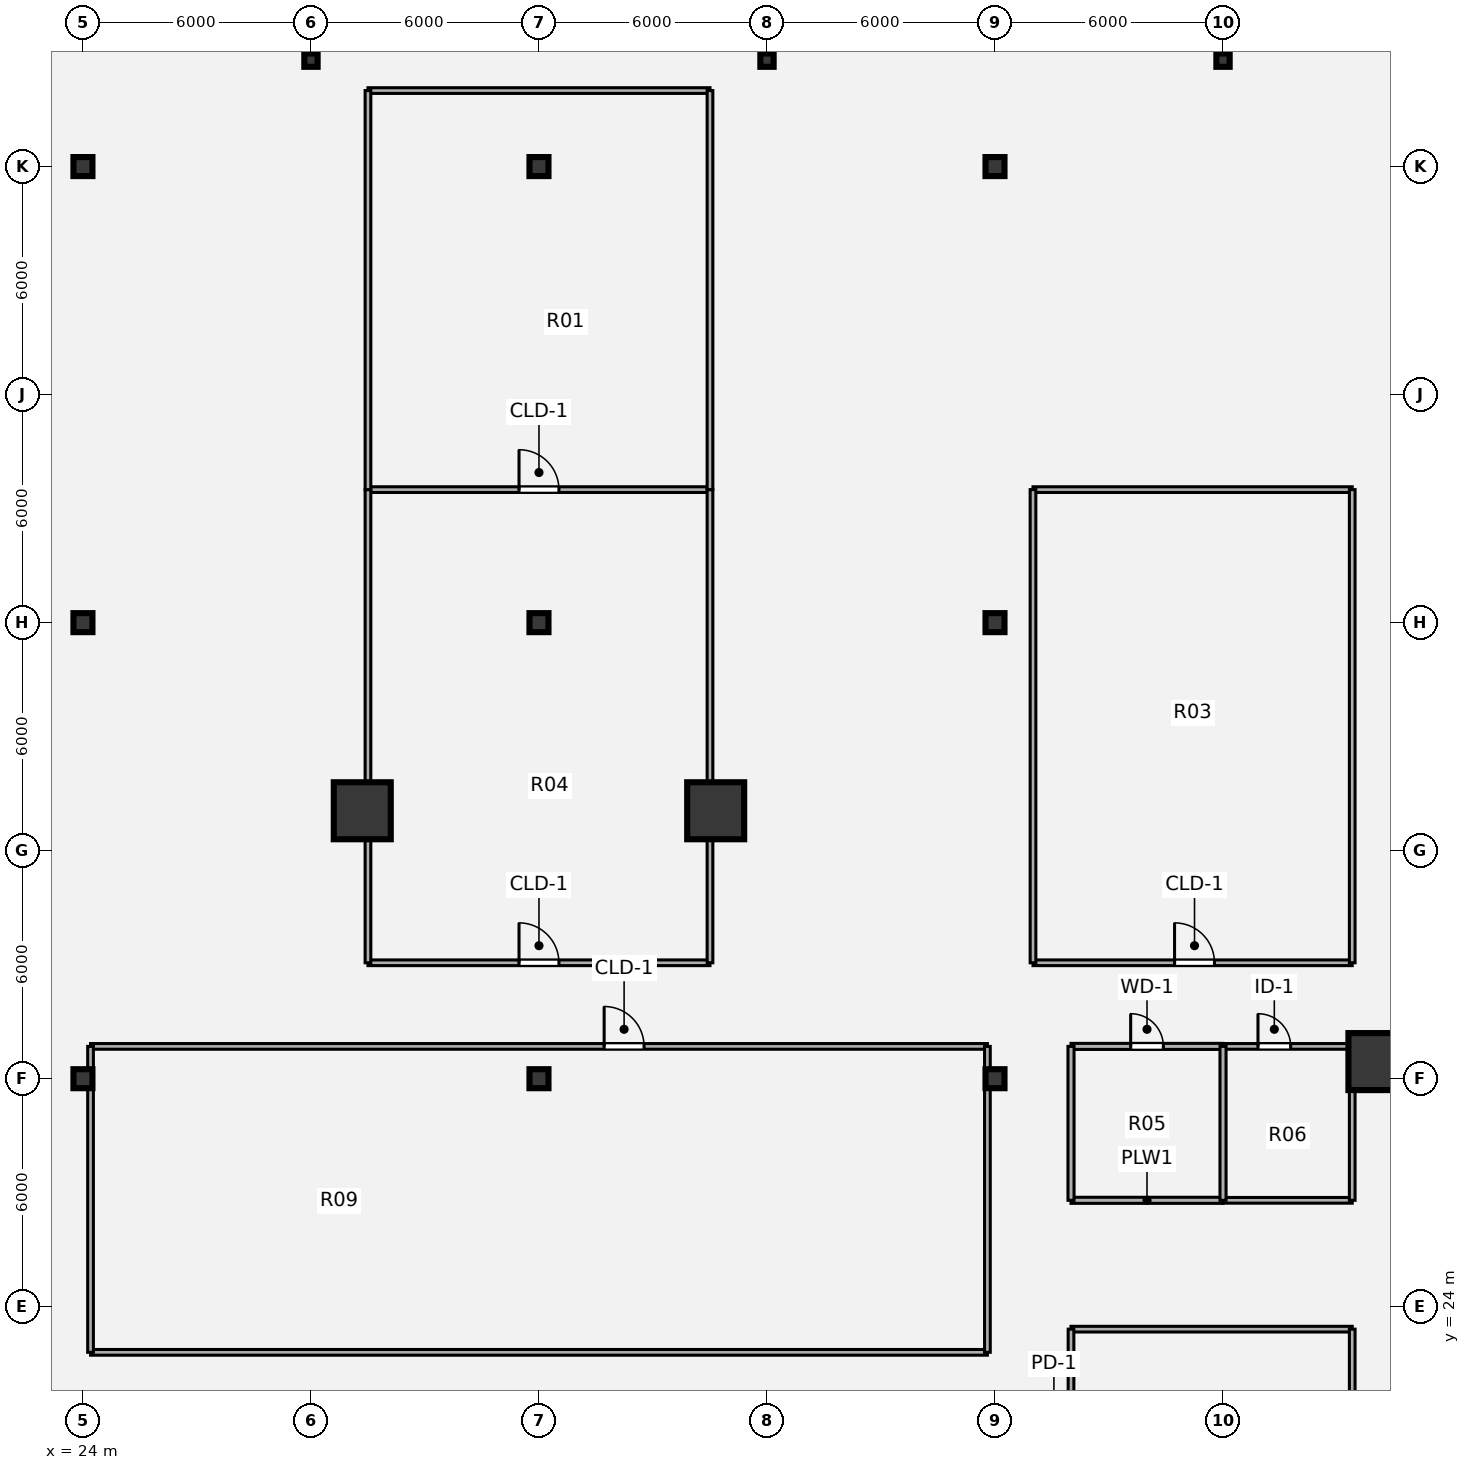
"""IFC4 building model, lengths in metres.
Left out: names, types, materials, properties, quantities, classifications, styles, units other than length and angle.
Written with IfcOpenShell. Run it as: python <this file> out.ifc"""

import sys

from ifc_helpers import new_model, si_unit, direction, frame, frame_2d, origin, origin_2d, place, context, subcontext, project, spatial, rectangle, hollow_circle, i_section, extrude, source, transform, mapped, element, fill, save


model = new_model("IFC4")
c1 = context("Model", 3, precision=1e-05, world=origin(), true_north=direction((0.0, 1.0)))
c2 = subcontext(c1, "Body", "Model", "MODEL_VIEW")
j1 = project(units=[si_unit("LENGTHUNIT", "METRE"), si_unit("PLANEANGLEUNIT", "RADIAN")], contexts=[c1])
p1 = place(None, origin())
s1 = spatial("IfcSite", under=j1, at=p1, CompositionType="ELEMENT")
p2 = place(p1, origin())
s2 = spatial("IfcBuilding", under=s1, at=p2, CompositionType="ELEMENT")
p3 = place(p2, frame((0.0, 0.0, 22.68)))
s3 = spatial("IfcBuildingStorey", under=s2, at=p3, CompositionType="ELEMENT", Elevation=22.68)
m1 = source(origin(), c2, "Body", "SweptSolid", [
    extrude(i_section(OverallWidth=0.5, OverallDepth=0.5, WebThickness=0.022, FlangeThickness=0.035, at=origin_2d()), origin(), (0.0, 0.0, 1.0), 4.32),
])
for number, where, z_axis, x_axis in (
    (1, (24.0, 30.0, 0.0), (0.0, 0.0, 1.0), (1.0, 0.0, 0.0)),
    (2, (36.0, 30.0, 0.0), (0.0, 0.0, 1.0), (1.0, 0.0, 0.0)),
    (3, (48.0, 30.0, 0.0), (0.0, 0.0, 1.0), (1.0, 0.0, 0.0)),
    (4, (24.0, 42.0, 0.0), (0.0, 0.0, 1.0), (1.0, 0.0, 0.0)),
    (5, (36.0, 42.0, 0.0), (0.0, 0.0, 1.0), (1.0, 0.0, 0.0)),
    (6, (48.0, 42.0, 0.0), (0.0, 0.0, 1.0), (1.0, 0.0, 0.0)),
    (7, (24.0, 54.0, 0.0), (0.0, 0.0, 1.0), (1.0, 0.0, 0.0)),
    (8, (36.0, 54.0, 0.0), (0.0, 0.0, 1.0), (1.0, 0.0, 0.0)),
    (9, (48.0, 54.0, 0.0), (0.0, 0.0, 1.0), (1.0, 0.0, 0.0)),
):
    element("IfcColumn", number, at=place(p3, frame(where, z_axis=z_axis, x_axis=x_axis)), inside=s3, PredefinedType="COLUMN", context=c2, shape_type="MappedRepresentation", body=[
        mapped(m1, transform((0.0, 0.0, 0.0), x_axis=(1.0, 0.0, 0.0), y_axis=(0.0, 1.0, 0.0), z_axis=(0.0, 0.0, 1.0), scale=1.0)),
    ])
m2 = source(origin(), c2, "Body", "SweptSolid", [
    extrude(i_section(OverallWidth=0.35, OverallDepth=0.35, WebThickness=0.02, FlangeThickness=0.028, at=origin_2d()), origin(), (0.0, 0.0, 1.0), 4.32),
])
for number, where, z_axis, x_axis in (
    (10, (30.0, 56.8, 0.0), (0.0, 0.0, 1.0), (1.0, 0.0, 0.0)),
    (11, (42.0, 56.8, 0.0), (0.0, 0.0, 1.0), (1.0, 0.0, 0.0)),
    (12, (54.0, 56.8, 0.0), (0.0, 0.0, 1.0), (1.0, 0.0, 0.0)),
):
    element("IfcColumn", number, at=place(p3, frame(where, z_axis=z_axis, x_axis=x_axis)), inside=s3, PredefinedType="COLUMN", context=c2, shape_type="MappedRepresentation", body=[
        mapped(m2, transform((0.0, 0.0, 0.0), x_axis=(1.0, 0.0, 0.0), y_axis=(0.0, 1.0, 0.0), z_axis=(0.0, 0.0, 1.0), scale=1.0)),
    ])
m3 = source(origin(), c2, "Body", "SweptSolid", [
    extrude(hollow_circle(Radius=0.75, WallThickness=0.05, at=origin_2d()), origin(), (0.0, 0.0, 1.0), 4.32),
])
for number, where, z_axis, x_axis in (
    (13, (58.05, 30.45, 0.0), (0.0, 0.0, 1.0), (1.0, 0.0, 0.0)),
    (14, (31.35, 37.05, 0.0), (0.0, 0.0, 1.0), (1.0, 0.0, 0.0)),
    (15, (40.65, 37.05, 0.0), (0.0, 0.0, 1.0), (1.0, 0.0, 0.0)),
):
    element("IfcColumn", number, at=place(p3, frame(where, z_axis=z_axis, x_axis=x_axis)), inside=s3, PredefinedType="COLUMN", context=c2, shape_type="MappedRepresentation", body=[
        mapped(m3, transform((0.0, 0.0, 0.0), x_axis=(1.0, 0.0, 0.0), y_axis=(0.0, 1.0, 0.0), z_axis=(0.0, 0.0, 1.0), scale=1.0)),
    ])
p4 = place(p3, frame((24.2, 22.8, 0.0), z_axis=(0.0, 0.0, 1.0), x_axis=(1.0, 0.0, 0.0)))
e16 = element("IfcWall", 16, at=p4, inside=s3, PredefinedType="PARTITIONING", context=c2, shape_type="SweptSolid", body=[
    extrude(rectangle(XDim=23.6, YDim=0.15, at=frame_2d((11.8, 0.0))), origin(), (0.0, 0.0, 1.0), 3.97),
])
p5 = place(p3, frame((50.0, 23.41, 0.0), z_axis=(0.0, 0.0, 1.0), x_axis=(1.0, 0.0, 0.0)))
e17 = element("IfcWall", 17, at=p5, inside=s3, PredefinedType="PARTITIONING", context=c2, shape_type="SweptSolid", body=[
    extrude(rectangle(XDim=7.4, YDim=0.15, at=frame_2d((3.7, 0.0))), origin(), (0.0, 0.0, 1.0), 3.97),
])
p6 = place(p3, frame((50.0, 26.8, 0.0), z_axis=(0.0, 0.0, 1.0), x_axis=(1.0, 0.0, 0.0)))
e18 = element("IfcWall", 18, at=p6, inside=s3, PredefinedType="PLUMBINGWALL", context=c2, shape_type="SweptSolid", body=[
    extrude(rectangle(XDim=4.0, YDim=0.16, at=frame_2d((2.0, 0.0))), origin(), (0.0, 0.0, 1.0), 3.97),
])
p7 = place(p3, frame((54.0, 26.8, 0.0), z_axis=(0.0, 0.0, 1.0), x_axis=(1.0, 0.0, 0.0)))
e19 = element("IfcWall", 19, at=p7, inside=s3, PredefinedType="PARTITIONING", context=c2, shape_type="SweptSolid", body=[
    extrude(rectangle(XDim=3.4, YDim=0.15, at=frame_2d((1.7, 0.0))), origin(), (0.0, 0.0, 1.0), 3.97),
])
p8 = place(p3, frame((24.2, 30.85, 0.0), z_axis=(0.0, 0.0, 1.0), x_axis=(1.0, 0.0, 0.0)))
e20 = element("IfcWall", 20, at=p8, inside=s3, PredefinedType="PARTITIONING", context=c2, shape_type="SweptSolid", body=[
    extrude(rectangle(XDim=23.6, YDim=0.15, at=frame_2d((11.8, 0.0))), origin(), (0.0, 0.0, 1.0), 3.97),
])
p9 = place(p8, frame((13.515, 0.0, 0.0)))
e21 = element("IfcOpeningElement", 21, at=p9, cuts=e20, PredefinedType="OPENING", context=c2, shape_type="SweptSolid", body=[
    extrude(rectangle(XDim=1.05, YDim=2.1, at=origin_2d()), frame((0.525, 0.085, 1.05), z_axis=(0.0, -1.0, 0.0), x_axis=(1.0, 0.0, 0.0)), (0.0, 0.0, 1.0), 0.17),
])
p10 = place(p3, frame((50.0, 30.85, 0.0), z_axis=(0.0, 0.0, 1.0), x_axis=(1.0, 0.0, 0.0)))
e22 = element("IfcWall", 22, at=p10, inside=s3, PredefinedType="PLUMBINGWALL", context=c2, shape_type="SweptSolid", body=[
    extrude(rectangle(XDim=4.0, YDim=0.16, at=frame_2d((2.0, 0.0))), origin(), (0.0, 0.0, 1.0), 3.97),
])
p11 = place(p10, frame((1.57, 0.0, 0.0)))
e23 = element("IfcOpeningElement", 23, at=p11, cuts=e22, PredefinedType="OPENING", context=c2, shape_type="SweptSolid", body=[
    extrude(rectangle(XDim=0.86, YDim=2.1, at=origin_2d()), frame((0.43, 0.09, 1.05), z_axis=(0.0, -1.0, 0.0), x_axis=(1.0, 0.0, 0.0)), (0.0, 0.0, 1.0), 0.18),
])
p12 = place(p3, frame((54.0, 30.85, 0.0), z_axis=(0.0, 0.0, 1.0), x_axis=(1.0, 0.0, 0.0)))
e24 = element("IfcWall", 24, at=p12, inside=s3, PredefinedType="PARTITIONING", context=c2, shape_type="SweptSolid", body=[
    extrude(rectangle(XDim=3.4, YDim=0.15, at=frame_2d((1.7, 0.0))), origin(), (0.0, 0.0, 1.0), 2.185),
])
p13 = place(p12, frame((0.92, 0.0, 0.0)))
e25 = element("IfcOpeningElement", 25, at=p13, cuts=e24, PredefinedType="OPENING", context=c2, shape_type="SweptSolid", body=[
    extrude(rectangle(XDim=0.86, YDim=2.1, at=origin_2d()), frame((0.43, 0.085, 1.05), z_axis=(0.0, -1.0, 0.0), x_axis=(1.0, 0.0, 0.0)), (0.0, 0.0, 1.0), 0.17),
])
p14 = place(p3, frame((31.5, 33.05, 0.0), z_axis=(0.0, 0.0, 1.0), x_axis=(1.0, 0.0, 0.0)))
e26 = element("IfcWall", 26, at=p14, inside=s3, PredefinedType="PARTITIONING", context=c2, shape_type="SweptSolid", body=[
    extrude(rectangle(XDim=9.0, YDim=0.15, at=frame_2d((4.5, 0.0))), origin(), (0.0, 0.0, 1.0), 3.97),
])
p15 = place(p14, frame((3.975, 0.0, 0.0)))
e27 = element("IfcOpeningElement", 27, at=p15, cuts=e26, PredefinedType="OPENING", context=c2, shape_type="SweptSolid", body=[
    extrude(rectangle(XDim=1.05, YDim=2.1, at=origin_2d()), frame((0.525, 0.085, 1.05), z_axis=(0.0, -1.0, 0.0), x_axis=(1.0, 0.0, 0.0)), (0.0, 0.0, 1.0), 0.17),
])
p16 = place(p3, frame((49.0, 33.05, 0.0), z_axis=(0.0, 0.0, 1.0), x_axis=(1.0, 0.0, 0.0)))
e28 = element("IfcWall", 28, at=p16, inside=s3, PredefinedType="PARTITIONING", context=c2, shape_type="SweptSolid", body=[
    extrude(rectangle(XDim=8.4, YDim=0.15, at=frame_2d((4.2, 0.0))), origin(), (0.0, 0.0, 1.0), 2.185),
])
p17 = place(p16, frame((3.725, 0.0, 0.0)))
e29 = element("IfcOpeningElement", 29, at=p17, cuts=e28, PredefinedType="OPENING", context=c2, shape_type="SweptSolid", body=[
    extrude(rectangle(XDim=1.05, YDim=2.1, at=origin_2d()), frame((0.525, 0.085, 1.05), z_axis=(0.0, -1.0, 0.0), x_axis=(1.0, 0.0, 0.0)), (0.0, 0.0, 1.0), 0.17),
])
p18 = place(p3, frame((31.5, 45.5, 0.0), z_axis=(0.0, 0.0, 1.0), x_axis=(1.0, 0.0, 0.0)))
e30 = element("IfcWall", 30, at=p18, inside=s3, PredefinedType="PARTITIONING", context=c2, shape_type="SweptSolid", body=[
    extrude(rectangle(XDim=9.0, YDim=0.15, at=frame_2d((4.5, 0.0))), origin(), (0.0, 0.0, 1.0), 3.97),
])
p19 = place(p18, frame((3.975, 0.0, 0.0)))
e31 = element("IfcOpeningElement", 31, at=p19, cuts=e30, PredefinedType="OPENING", context=c2, shape_type="SweptSolid", body=[
    extrude(rectangle(XDim=1.05, YDim=2.1, at=origin_2d()), frame((0.525, 0.085, 1.05), z_axis=(0.0, -1.0, 0.0), x_axis=(1.0, 0.0, 0.0)), (0.0, 0.0, 1.0), 0.17),
])
p20 = place(p3, frame((49.0, 45.5, 0.0), z_axis=(0.0, 0.0, 1.0), x_axis=(1.0, 0.0, 0.0)))
e32 = element("IfcWall", 32, at=p20, inside=s3, PredefinedType="PARTITIONING", context=c2, shape_type="SweptSolid", body=[
    extrude(rectangle(XDim=8.4, YDim=0.15, at=frame_2d((4.2, 0.0))), origin(), (0.0, 0.0, 1.0), 3.97),
])
p21 = place(p3, frame((31.5, 56.0, 0.0), z_axis=(0.0, 0.0, 1.0), x_axis=(1.0, 0.0, 0.0)))
e33 = element("IfcWall", 33, at=p21, inside=s3, PredefinedType="PARTITIONING", context=c2, shape_type="SweptSolid", body=[
    extrude(rectangle(XDim=9.0, YDim=0.15, at=frame_2d((4.5, 0.0))), origin(), (0.0, 0.0, 1.0), 3.97),
])
p22 = place(p3, frame((24.2, 22.8, 0.0), z_axis=(0.0, 0.0, 1.0), x_axis=(0.0, 1.0, 0.0)))
e34 = element("IfcWall", 34, at=p22, inside=s3, PredefinedType="PARTITIONING", context=c2, shape_type="SweptSolid", body=[
    extrude(rectangle(XDim=8.05, YDim=0.15, at=frame_2d((4.025, 0.0))), origin(), (0.0, 0.0, 1.0), 2.185),
])
p23 = place(p3, frame((31.5, 33.05, 0.0), z_axis=(0.0, 0.0, 1.0), x_axis=(0.0, 1.0, 0.0)))
e35 = element("IfcWall", 35, at=p23, inside=s3, PredefinedType="PARTITIONING", context=c2, shape_type="SweptSolid", body=[
    extrude(rectangle(XDim=12.45, YDim=0.15, at=frame_2d((6.225, 0.0))), origin(), (0.0, 0.0, 1.0), 2.185),
])
p24 = place(p3, frame((31.5, 45.5, 0.0), z_axis=(0.0, 0.0, 1.0), x_axis=(0.0, 1.0, 0.0)))
e36 = element("IfcWall", 36, at=p24, inside=s3, PredefinedType="PARTITIONING", context=c2, shape_type="SweptSolid", body=[
    extrude(rectangle(XDim=10.5, YDim=0.15, at=frame_2d((5.25, 0.0))), origin(), (0.0, 0.0, 1.0), 3.97),
])
p25 = place(p3, frame((40.5, 33.05, 0.0), z_axis=(0.0, 0.0, 1.0), x_axis=(0.0, 1.0, 0.0)))
e37 = element("IfcWall", 37, at=p25, inside=s3, PredefinedType="PARTITIONING", context=c2, shape_type="SweptSolid", body=[
    extrude(rectangle(XDim=12.45, YDim=0.15, at=frame_2d((6.225, 0.0))), origin(), (0.0, 0.0, 1.0), 2.185),
])
p26 = place(p3, frame((40.5, 45.5, 0.0), z_axis=(0.0, 0.0, 1.0), x_axis=(0.0, 1.0, 0.0)))
e38 = element("IfcWall", 38, at=p26, inside=s3, PredefinedType="PARTITIONING", context=c2, shape_type="SweptSolid", body=[
    extrude(rectangle(XDim=10.5, YDim=0.15, at=frame_2d((5.25, 0.0))), origin(), (0.0, 0.0, 1.0), 3.97),
])
p27 = place(p3, frame((47.8, 22.8, 0.0), z_axis=(0.0, 0.0, 1.0), x_axis=(0.0, 1.0, 0.0)))
e39 = element("IfcWall", 39, at=p27, inside=s3, PredefinedType="PARTITIONING", context=c2, shape_type="SweptSolid", body=[
    extrude(rectangle(XDim=8.05, YDim=0.15, at=frame_2d((4.025, 0.0))), origin(), (0.0, 0.0, 1.0), 2.185),
])
p28 = place(p3, frame((49.0, 33.05, 0.0), z_axis=(0.0, 0.0, 1.0), x_axis=(0.0, 1.0, 0.0)))
e40 = element("IfcWall", 40, at=p28, inside=s3, PredefinedType="PARTITIONING", context=c2, shape_type="SweptSolid", body=[
    extrude(rectangle(XDim=12.45, YDim=0.15, at=frame_2d((6.225, 0.0))), origin(), (0.0, 0.0, 1.0), 3.97),
])
p29 = place(p3, frame((50.0, 6.2, 0.0), z_axis=(0.0, 0.0, 1.0), x_axis=(0.0, 1.0, 0.0)))
e41 = element("IfcWall", 41, at=p29, inside=s3, PredefinedType="PARTITIONING", context=c2, shape_type="SweptSolid", body=[
    extrude(rectangle(XDim=17.21, YDim=0.15, at=frame_2d((8.605, 0.0))), origin(), (0.0, 0.0, 1.0), 3.678),
])
p30 = place(p29, frame((14.15, 0.0, 0.0)))
e42 = element("IfcOpeningElement", 42, at=p30, cuts=e41, PredefinedType="OPENING", context=c2, shape_type="SweptSolid", body=[
    extrude(rectangle(XDim=1.1, YDim=2.1, at=origin_2d()), frame((0.55, 0.085, 1.05), z_axis=(0.0, -1.0, 0.0), x_axis=(1.0, 0.0, 0.0)), (0.0, 0.0, 1.0), 0.17),
])
for number, where, z_axis, x_axis in (
    (43, (50.0, 26.8, 0.0), (0.0, 0.0, 1.0), (0.0, 1.0, 0.0)),
    (44, (54.0, 26.8, 0.0), (0.0, 0.0, 1.0), (0.0, 1.0, 0.0)),
):
    element("IfcWall", number, at=place(p3, frame(where, z_axis=z_axis, x_axis=x_axis)), inside=s3, PredefinedType="PLUMBINGWALL", context=c2, shape_type="SweptSolid", body=[
        extrude(rectangle(XDim=4.05, YDim=0.16, at=frame_2d((2.025, 0.0))), origin(), (0.0, 0.0, 1.0), 3.626),
    ])
p31 = place(p3, frame((57.4, 6.2, 0.0), z_axis=(0.0, 0.0, 1.0), x_axis=(0.0, 1.0, 0.0)))
e45 = element("IfcWall", 45, at=p31, inside=s3, PredefinedType="PARTITIONING", context=c2, shape_type="SweptSolid", body=[
    extrude(rectangle(XDim=17.21, YDim=0.15, at=frame_2d((8.605, 0.0))), origin(), (0.0, 0.0, 1.0), 3.97),
])
p32 = place(p3, frame((57.4, 26.8, 0.0), z_axis=(0.0, 0.0, 1.0), x_axis=(0.0, 1.0, 0.0)))
e46 = element("IfcWall", 46, at=p32, inside=s3, PredefinedType="PARTITIONING", context=c2, shape_type="SweptSolid", body=[
    extrude(rectangle(XDim=4.05, YDim=0.15, at=frame_2d((2.025, 0.0))), origin(), (0.0, 0.0, 1.0), 3.97),
])
p33 = place(p3, frame((57.4, 33.05, 0.0), z_axis=(0.0, 0.0, 1.0), x_axis=(0.0, 1.0, 0.0)))
e47 = element("IfcWall", 47, at=p33, inside=s3, PredefinedType="PARTITIONING", context=c2, shape_type="SweptSolid", body=[
    extrude(rectangle(XDim=12.45, YDim=0.15, at=frame_2d((6.225, 0.0))), origin(), (0.0, 0.0, 1.0), 3.97),
])
m4 = source(origin(), c2, "Body", "SweptSolid", [
    extrude(rectangle(XDim=1.05, YDim=2.1, at=origin_2d()), frame((0.525, 0.025, 1.05), z_axis=(0.0, -1.0, 0.0), x_axis=(1.0, 0.0, 0.0)), (0.0, 0.0, 1.0), 0.05),
])
p34 = place(p9, origin())
e48 = element("IfcDoor", 48, at=p34, inside=s3, OperationType="SINGLE_SWING_LEFT", PredefinedType="DOOR", context=c2, shape_type="MappedRepresentation", body=[
    mapped(m4, transform((0.0, 0.0, 0.0), x_axis=(1.0, 0.0, 0.0), y_axis=(0.0, 1.0, 0.0), z_axis=(0.0, 0.0, 1.0), scale=1.0)),
])
fill(e21, e48)
m5 = source(origin(), c2, "Body", "SweptSolid", [
    extrude(rectangle(XDim=0.86, YDim=2.1, at=origin_2d()), frame((0.43, 0.025, 1.05), z_axis=(0.0, -1.0, 0.0), x_axis=(1.0, 0.0, 0.0)), (0.0, 0.0, 1.0), 0.05),
])
p35 = place(p11, origin())
e49 = element("IfcDoor", 49, at=p35, inside=s3, OperationType="SINGLE_SWING_LEFT", PredefinedType="DOOR", context=c2, shape_type="MappedRepresentation", body=[
    mapped(m5, transform((0.0, 0.0, 0.0), x_axis=(1.0, 0.0, 0.0), y_axis=(0.0, 1.0, 0.0), z_axis=(0.0, 0.0, 1.0), scale=1.0)),
])
fill(e23, e49)
m6 = source(origin(), c2, "Body", "SweptSolid", [
    extrude(rectangle(XDim=0.86, YDim=2.1, at=origin_2d()), frame((0.43, 0.025, 1.05), z_axis=(0.0, -1.0, 0.0), x_axis=(1.0, 0.0, 0.0)), (0.0, 0.0, 1.0), 0.05),
])
p36 = place(p13, origin())
e50 = element("IfcDoor", 50, at=p36, inside=s3, OperationType="SINGLE_SWING_LEFT", PredefinedType="DOOR", context=c2, shape_type="MappedRepresentation", body=[
    mapped(m6, transform((0.0, 0.0, 0.0), x_axis=(1.0, 0.0, 0.0), y_axis=(0.0, 1.0, 0.0), z_axis=(0.0, 0.0, 1.0), scale=1.0)),
])
fill(e25, e50)
p37 = place(p15, origin())
e51 = element("IfcDoor", 51, at=p37, inside=s3, OperationType="SINGLE_SWING_LEFT", PredefinedType="DOOR", context=c2, shape_type="MappedRepresentation", body=[
    mapped(m4, transform((0.0, 0.0, 0.0), x_axis=(1.0, 0.0, 0.0), y_axis=(0.0, 1.0, 0.0), z_axis=(0.0, 0.0, 1.0), scale=1.0)),
])
fill(e27, e51)
p38 = place(p17, origin())
e52 = element("IfcDoor", 52, at=p38, inside=s3, OperationType="SINGLE_SWING_LEFT", PredefinedType="DOOR", context=c2, shape_type="MappedRepresentation", body=[
    mapped(m4, transform((0.0, 0.0, 0.0), x_axis=(1.0, 0.0, 0.0), y_axis=(0.0, 1.0, 0.0), z_axis=(0.0, 0.0, 1.0), scale=1.0)),
])
fill(e29, e52)
p39 = place(p19, origin())
e53 = element("IfcDoor", 53, at=p39, inside=s3, OperationType="SINGLE_SWING_LEFT", PredefinedType="DOOR", context=c2, shape_type="MappedRepresentation", body=[
    mapped(m4, transform((0.0, 0.0, 0.0), x_axis=(1.0, 0.0, 0.0), y_axis=(0.0, 1.0, 0.0), z_axis=(0.0, 0.0, 1.0), scale=1.0)),
])
fill(e31, e53)
save(model, sys.argv[1])
